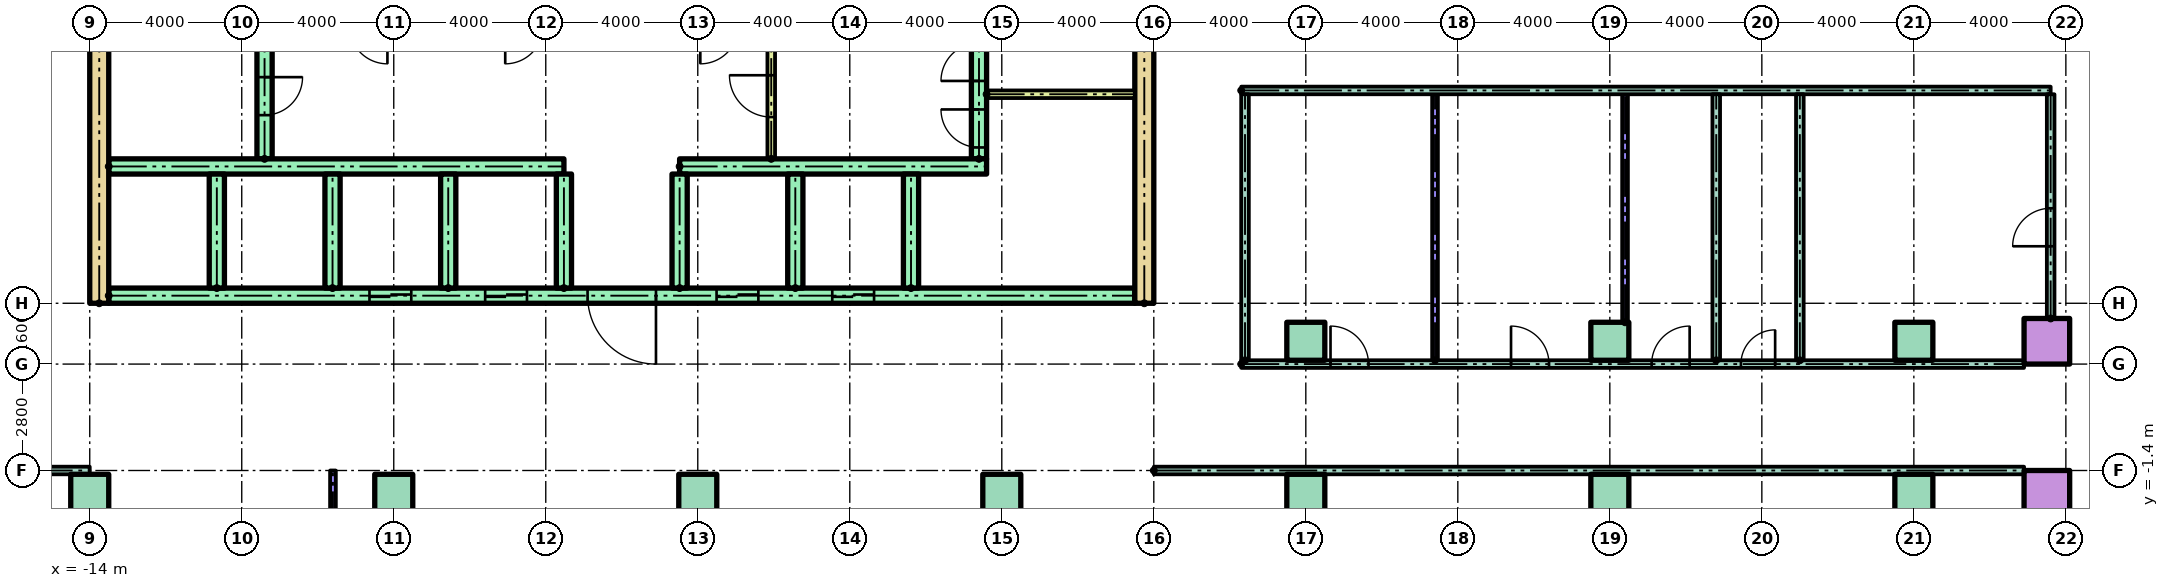
"""IFC4 building model, lengths in metres.
Left out: names, types, materials, properties, quantities, classifications, styles, units other than length and angle.
Written with IfcOpenShell. Run it as: python <this file> out.ifc"""

import sys

from ifc_helpers import new_model, si_unit, direction, frame, frame_2d, origin, origin_2d, place, context, subcontext, project, spatial, rectangle, hollow_rectangle, extrude, element, fill, save


model = new_model("IFC4")
c1 = context("Model", 3, precision=1e-05, world=origin(), true_north=direction((0.0, 1.0)))
c2 = subcontext(c1, "Body", "Model", "MODEL_VIEW")
j1 = project(units=[si_unit("LENGTHUNIT", "METRE"), si_unit("PLANEANGLEUNIT", "RADIAN")], contexts=[c1])
p1 = place(None, origin())
s1 = spatial("IfcSite", under=j1, at=p1, CompositionType="ELEMENT")
p2 = place(p1, origin())
s2 = spatial("IfcBuilding", under=s1, at=p2, CompositionType="ELEMENT")
p3 = place(p2, frame((0.0, 0.0, 14.0)))
s3 = spatial("IfcBuildingStorey", under=s2, at=p3, CompositionType="ELEMENT", Elevation=14.0)
for number, where in (
    (1, (-14.0, -2.0, 0.0)),
    (2, (-6.0, -2.0, 0.0)),
    (3, (2.0, -2.0, 0.0)),
    (4, (10.0, -2.0, 0.0)),
    (5, (18.0, -2.0, 0.0)),
    (6, (26.0, -2.0, 0.0)),
    (7, (34.0, -2.0, 0.0)),
):
    element("IfcColumn", number, at=place(p3, frame(where)), inside=s3, PredefinedType="COLUMN", context=c2, shape_type="SweptSolid", body=[
        extrude(rectangle(XDim=1.0, YDim=1.0, at=origin_2d()), origin(), (0.0, 0.0, 1.0), 4.0),
    ])
p4 = place(p3, frame((37.5, -2.0, 0.0)))
e8 = element("IfcColumn", 8, at=p4, inside=s3, PredefinedType="COLUMN", context=c2, shape_type="SweptSolid", body=[
    extrude(hollow_rectangle(XDim=1.2, YDim=1.2, WallThickness=0.06, at=origin_2d()), origin(), (0.0, 0.0, 1.0), 4.0),
])
for number, where in (
    (9, (18.0, 2.0, 0.0)),
    (10, (26.0, 2.0, 0.0)),
    (11, (34.0, 2.0, 0.0)),
):
    element("IfcColumn", number, at=place(p3, frame(where)), inside=s3, PredefinedType="COLUMN", context=c2, shape_type="SweptSolid", body=[
        extrude(rectangle(XDim=1.0, YDim=1.0, at=origin_2d()), origin(), (0.0, 0.0, 1.0), 4.0),
    ])
p5 = place(p3, frame((37.5, 2.0, 0.0)))
e12 = element("IfcColumn", 12, at=p5, inside=s3, PredefinedType="COLUMN", context=c2, shape_type="SweptSolid", body=[
    extrude(hollow_rectangle(XDim=1.2, YDim=1.2, WallThickness=0.06, at=origin_2d()), origin(), (0.0, 0.0, 1.0), 4.0),
])
for number, where, z_axis, x_axis in (
    (13, (-13.75, 3.0, 0.0), (0.0, 0.0, 1.0), (0.0, 1.0, 0.0)),
    (14, (13.75, 3.0, 0.0), (0.0, 0.0, 1.0), (0.0, 1.0, 0.0)),
):
    element("IfcWall", number, at=place(p3, frame(where, z_axis=z_axis, x_axis=x_axis)), inside=s3, PredefinedType="SHEAR", context=c2, shape_type="SweptSolid", body=[
        extrude(rectangle(XDim=17.0, YDim=0.5, at=frame_2d((8.5, 0.0))), origin(), (0.0, 0.0, 1.0), 3.7),
    ])
p6 = place(p3, frame((-9.4, 6.8, 0.0), z_axis=(0.0, 0.0, 1.0), x_axis=(0.0, 1.0, 0.0)))
e15 = element("IfcWall", 15, at=p6, inside=s3, PredefinedType="SHEAR", context=c2, shape_type="SweptSolid", body=[
    extrude(rectangle(XDim=12.7, YDim=0.4, at=frame_2d((6.35, 0.0))), origin(), (0.0, 0.0, 1.0), 3.7),
])
p7 = place(p6, frame((1.15, 0.0, 0.0)))
e16 = element("IfcOpeningElement", 16, at=p7, cuts=e15, PredefinedType="OPENING", context=c2, shape_type="SweptSolid", body=[
    extrude(rectangle(XDim=1.0, YDim=2.1, at=frame_2d((0.5, 1.05))), frame((0.0, 0.21, 0.0), z_axis=(0.0, -1.0, 0.0), x_axis=(1.0, 0.0, 0.0)), (0.0, 0.0, 1.0), 0.42),
])
p8 = place(p6, frame((7.925, 0.0, 0.0)))
e17 = element("IfcOpeningElement", 17, at=p8, cuts=e15, PredefinedType="OPENING", context=c2, shape_type="SweptSolid", body=[
    extrude(rectangle(XDim=1.0, YDim=2.1, at=frame_2d((0.5, 1.05))), frame((0.0, 0.21, 0.0), z_axis=(0.0, -1.0, 0.0), x_axis=(1.0, 0.0, 0.0)), (0.0, 0.0, 1.0), 0.42),
])
p9 = place(p3, frame((9.4, 6.8, 0.0), z_axis=(0.0, 0.0, 1.0), x_axis=(0.0, 1.0, 0.0)))
e18 = element("IfcWall", 18, at=p9, inside=s3, PredefinedType="SHEAR", context=c2, shape_type="SweptSolid", body=[
    extrude(rectangle(XDim=12.7, YDim=0.4, at=frame_2d((6.35, 0.0))), origin(), (0.0, 0.0, 1.0), 3.7),
])
p10 = place(p9, frame((0.3, 0.0, 0.0)))
e19 = element("IfcOpeningElement", 19, at=p10, cuts=e18, PredefinedType="OPENING", context=c2, shape_type="SweptSolid", body=[
    extrude(rectangle(XDim=1.0, YDim=2.1, at=frame_2d((0.5, 1.05))), frame((0.0, 0.21, 0.0), z_axis=(0.0, -1.0, 0.0), x_axis=(1.0, 0.0, 0.0)), (0.0, 0.0, 1.0), 0.42),
])
p11 = place(p9, frame((2.05, 0.0, 0.0)))
e20 = element("IfcOpeningElement", 20, at=p11, cuts=e18, PredefinedType="OPENING", context=c2, shape_type="SweptSolid", body=[
    extrude(rectangle(XDim=1.0, YDim=2.1, at=frame_2d((0.5, 1.05))), frame((0.0, 0.21, 0.0), z_axis=(0.0, -1.0, 0.0), x_axis=(1.0, 0.0, 0.0)), (0.0, 0.0, 1.0), 0.42),
])
p12 = place(p9, frame((7.925, 0.0, 0.0)))
e21 = element("IfcOpeningElement", 21, at=p12, cuts=e18, PredefinedType="OPENING", context=c2, shape_type="SweptSolid", body=[
    extrude(rectangle(XDim=1.0, YDim=2.1, at=frame_2d((0.5, 1.05))), frame((0.0, 0.21, 0.0), z_axis=(0.0, -1.0, 0.0), x_axis=(1.0, 0.0, 0.0)), (0.0, 0.0, 1.0), 0.42),
])
p13 = place(p3, frame((-13.5, 3.2, 0.0)))
e22 = element("IfcWall", 22, at=p13, inside=s3, PredefinedType="SHEAR", context=c2, shape_type="SweptSolid", body=[
    extrude(rectangle(XDim=27.0, YDim=0.4, at=frame_2d((13.5, 0.0))), origin(), (0.0, 0.0, 1.0), 3.7),
])
p14 = place(p13, frame((6.861, 0.0, 0.0)))
e23 = element("IfcOpeningElement", 23, at=p14, cuts=e22, PredefinedType="OPENING", context=c2, shape_type="SweptSolid", body=[
    extrude(rectangle(XDim=1.1, YDim=2.1, at=frame_2d((0.55, 1.05))), frame((0.0, 0.21, 0.0), z_axis=(0.0, -1.0, 0.0), x_axis=(1.0, 0.0, 0.0)), (0.0, 0.0, 1.0), 0.42),
])
p15 = place(p13, frame((9.906, 0.0, 0.0)))
e24 = element("IfcOpeningElement", 24, at=p15, cuts=e22, PredefinedType="OPENING", context=c2, shape_type="SweptSolid", body=[
    extrude(rectangle(XDim=1.1, YDim=2.1, at=frame_2d((0.55, 1.05))), frame((0.0, 0.21, 0.0), z_axis=(0.0, -1.0, 0.0), x_axis=(1.0, 0.0, 0.0)), (0.0, 0.0, 1.0), 0.42),
])
p16 = place(p13, frame((15.994, 0.0, 0.0)))
e25 = element("IfcOpeningElement", 25, at=p16, cuts=e22, PredefinedType="OPENING", context=c2, shape_type="SweptSolid", body=[
    extrude(rectangle(XDim=1.1, YDim=2.1, at=frame_2d((0.55, 1.05))), frame((0.0, 0.21, 0.0), z_axis=(0.0, -1.0, 0.0), x_axis=(1.0, 0.0, 0.0)), (0.0, 0.0, 1.0), 0.42),
])
p17 = place(p13, frame((19.039, 0.0, 0.0)))
e26 = element("IfcOpeningElement", 26, at=p17, cuts=e22, PredefinedType="OPENING", context=c2, shape_type="SweptSolid", body=[
    extrude(rectangle(XDim=1.1, YDim=2.1, at=frame_2d((0.55, 1.05))), frame((0.0, 0.21, 0.0), z_axis=(0.0, -1.0, 0.0), x_axis=(1.0, 0.0, 0.0)), (0.0, 0.0, 1.0), 0.42),
])
p18 = place(p13, frame((12.6, 0.0, 0.0)))
e27 = element("IfcOpeningElement", 27, at=p18, cuts=e22, PredefinedType="OPENING", context=c2, shape_type="SweptSolid", body=[
    extrude(rectangle(XDim=1.8, YDim=2.1, at=frame_2d((0.9, 1.05))), frame((0.0, 0.21, 0.0), z_axis=(0.0, -1.0, 0.0), x_axis=(1.0, 0.0, 0.0)), (0.0, 0.0, 1.0), 0.42),
])
p19 = place(p3, frame((-13.5, 6.6, 0.0)))
e28 = element("IfcWall", 28, at=p19, inside=s3, PredefinedType="SHEAR", context=c2, shape_type="SweptSolid", body=[
    extrude(rectangle(XDim=11.978, YDim=0.4, at=frame_2d((5.989, 0.0))), origin(), (0.0, 0.0, 1.0), 3.7),
])
p20 = place(p3, frame((1.522, 6.6, 0.0)))
e29 = element("IfcWall", 29, at=p20, inside=s3, PredefinedType="SHEAR", context=c2, shape_type="SweptSolid", body=[
    extrude(rectangle(XDim=8.078, YDim=0.4, at=frame_2d((4.039, 0.0))), origin(), (0.0, 0.0, 1.0), 3.7),
])
for number, where, z_axis, x_axis in (
    (30, (-10.656, 3.4, 0.0), (0.0, 0.0, 1.0), (0.0, 1.0, 0.0)),
    (31, (-7.611, 3.4, 0.0), (0.0, 0.0, 1.0), (0.0, 1.0, 0.0)),
    (32, (-4.567, 3.4, 0.0), (0.0, 0.0, 1.0), (0.0, 1.0, 0.0)),
    (33, (-1.522, 3.4, 0.0), (0.0, 0.0, 1.0), (0.0, 1.0, 0.0)),
    (34, (1.522, 3.4, 0.0), (0.0, 0.0, 1.0), (0.0, 1.0, 0.0)),
    (35, (4.567, 3.4, 0.0), (0.0, 0.0, 1.0), (0.0, 1.0, 0.0)),
    (36, (7.611, 3.4, 0.0), (0.0, 0.0, 1.0), (0.0, 1.0, 0.0)),
):
    element("IfcWall", number, at=place(p3, frame(where, z_axis=z_axis, x_axis=x_axis)), inside=s3, PredefinedType="SHEAR", context=c2, shape_type="SweptSolid", body=[
        extrude(rectangle(XDim=3.0, YDim=0.4, at=frame_2d((1.5, 0.0))), origin(), (0.0, 0.0, 1.0), 3.7),
    ])
p21 = place(p3, frame((3.933, 6.8, 0.0), z_axis=(0.0, 0.0, 1.0), x_axis=(0.0, 1.0, 0.0)))
e37 = element("IfcWall", 37, at=p21, inside=s3, PredefinedType="PARTITIONING", context=c2, shape_type="SweptSolid", body=[
    extrude(rectangle(XDim=3.3, YDim=0.2, at=frame_2d((1.65, 0.0))), origin(), (0.0, 0.0, 1.0), 3.7),
])
p22 = place(p21, frame((1.1, 0.0, 0.0)))
e38 = element("IfcOpeningElement", 38, at=p22, cuts=e37, PredefinedType="OPENING", context=c2, shape_type="SweptSolid", body=[
    extrude(rectangle(XDim=1.1, YDim=2.1, at=frame_2d((0.55, 1.05))), frame((0.0, 0.11, 0.0), z_axis=(0.0, -1.0, 0.0), x_axis=(1.0, 0.0, 0.0)), (0.0, 0.0, 1.0), 0.22),
])
p23 = place(p3, frame((9.6, 8.5, 0.0)))
e39 = element("IfcWall", 39, at=p23, inside=s3, PredefinedType="PARTITIONING", context=c2, shape_type="SweptSolid", body=[
    extrude(rectangle(XDim=3.9, YDim=0.2, at=frame_2d((1.95, 0.0))), origin(), (0.0, 0.0, 1.0), 3.7),
])
for number, where in (
    (40, (-36.9, -1.4, 0.0)),
    (41, (14.0, -1.4, 0.0)),
):
    element("IfcWall", number, at=place(p3, frame(where)), inside=s3, PredefinedType="PARTITIONING", context=c2, shape_type="SweptSolid", body=[
        extrude(rectangle(XDim=22.9, YDim=0.2, at=frame_2d((11.45, 0.0))), origin(), (0.0, 0.0, 1.0), 3.7),
    ])
p24 = place(p3, frame((16.3, 1.4, 0.0)))
e42 = element("IfcWall", 42, at=p24, inside=s3, PredefinedType="PARTITIONING", context=c2, shape_type="SweptSolid", body=[
    extrude(rectangle(XDim=20.6, YDim=0.2, at=frame_2d((10.3, 0.0))), origin(), (0.0, 0.0, 1.0), 3.7),
])
p25 = place(p24, frame((2.35, 0.0, 0.0)))
e43 = element("IfcOpeningElement", 43, at=p25, cuts=e42, PredefinedType="OPENING", context=c2, shape_type="SweptSolid", body=[
    extrude(rectangle(XDim=1.0, YDim=2.1, at=frame_2d((0.5, 1.05))), frame((0.0, 0.11, 0.0), z_axis=(0.0, -1.0, 0.0), x_axis=(1.0, 0.0, 0.0)), (0.0, 0.0, 1.0), 0.22),
])
p26 = place(p24, frame((7.1, 0.0, 0.0)))
e44 = element("IfcOpeningElement", 44, at=p26, cuts=e42, PredefinedType="OPENING", context=c2, shape_type="SweptSolid", body=[
    extrude(rectangle(XDim=1.0, YDim=2.1, at=frame_2d((0.5, 1.05))), frame((0.0, 0.11, 0.0), z_axis=(0.0, -1.0, 0.0), x_axis=(1.0, 0.0, 0.0)), (0.0, 0.0, 1.0), 0.22),
])
p27 = place(p24, frame((10.8, 0.0, 0.0)))
e45 = element("IfcOpeningElement", 45, at=p27, cuts=e42, PredefinedType="OPENING", context=c2, shape_type="SweptSolid", body=[
    extrude(rectangle(XDim=1.0, YDim=2.1, at=frame_2d((0.5, 1.05))), frame((0.0, 0.11, 0.0), z_axis=(0.0, -1.0, 0.0), x_axis=(1.0, 0.0, 0.0)), (0.0, 0.0, 1.0), 0.22),
])
p28 = place(p24, frame((13.15, 0.0, 0.0)))
e46 = element("IfcOpeningElement", 46, at=p28, cuts=e42, PredefinedType="OPENING", context=c2, shape_type="SweptSolid", body=[
    extrude(rectangle(XDim=0.9, YDim=2.1, at=frame_2d((0.45, 1.05))), frame((0.0, 0.11, 0.0), z_axis=(0.0, -1.0, 0.0), x_axis=(1.0, 0.0, 0.0)), (0.0, 0.0, 1.0), 0.22),
])
p29 = place(p3, frame((16.3, 8.6, 0.0)))
e47 = element("IfcWall", 47, at=p29, inside=s3, PredefinedType="PARTITIONING", context=c2, shape_type="SweptSolid", body=[
    extrude(rectangle(XDim=21.3, YDim=0.2, at=frame_2d((10.65, 0.0))), origin(), (0.0, 0.0, 1.0), 3.7),
])
p30 = place(p3, frame((-7.6, -6.25, 0.0), z_axis=(0.0, 0.0, 1.0), x_axis=(0.0, 1.0, 0.0)))
e48 = element("IfcWall", 48, at=p30, inside=s3, PredefinedType="PARTITIONING", context=c2, shape_type="SweptSolid", body=[
    extrude(rectangle(XDim=4.85, YDim=0.15, at=frame_2d((2.425, 0.0))), origin(), (0.0, 0.0, 1.0), 3.7),
])
p31 = place(p3, frame((16.4, 1.5, 0.0), z_axis=(0.0, 0.0, 1.0), x_axis=(0.0, 1.0, 0.0)))
e49 = element("IfcWall", 49, at=p31, inside=s3, PredefinedType="PARTITIONING", context=c2, shape_type="SweptSolid", body=[
    extrude(rectangle(XDim=7.0, YDim=0.2, at=frame_2d((3.5, 0.0))), origin(), (0.0, 0.0, 1.0), 3.7),
])
p32 = place(p3, frame((21.4, 1.5, 0.0), z_axis=(0.0, 0.0, 1.0), x_axis=(0.0, 1.0, 0.0)))
e50 = element("IfcWall", 50, at=p32, inside=s3, PredefinedType="PARTITIONING", context=c2, shape_type="SweptSolid", body=[
    extrude(rectangle(XDim=7.0, YDim=0.15, at=frame_2d((3.5, 0.0))), origin(), (0.0, 0.0, 1.0), 3.7),
])
p33 = place(p3, frame((26.4, 2.5, 0.0), z_axis=(0.0, 0.0, 1.0), x_axis=(0.0, 1.0, 0.0)))
e51 = element("IfcWall", 51, at=p33, inside=s3, PredefinedType="PARTITIONING", context=c2, shape_type="SweptSolid", body=[
    extrude(rectangle(XDim=6.0, YDim=0.15, at=frame_2d((3.0, 0.0))), origin(), (0.0, 0.0, 1.0), 3.7),
])
for number, where, z_axis, x_axis in (
    (52, (28.8, 1.5, 0.0), (0.0, 0.0, 1.0), (0.0, 1.0, 0.0)),
    (53, (31.0, 1.5, 0.0), (0.0, 0.0, 1.0), (0.0, 1.0, 0.0)),
):
    element("IfcWall", number, at=place(p3, frame(where, z_axis=z_axis, x_axis=x_axis)), inside=s3, PredefinedType="PARTITIONING", context=c2, shape_type="SweptSolid", body=[
        extrude(rectangle(XDim=7.0, YDim=0.2, at=frame_2d((3.5, 0.0))), origin(), (0.0, 0.0, 1.0), 3.7),
    ])
p34 = place(p3, frame((37.6, 2.6, 0.0), z_axis=(0.0, 0.0, 1.0), x_axis=(0.0, 1.0, 0.0)))
e54 = element("IfcWall", 54, at=p34, inside=s3, PredefinedType="PARTITIONING", context=c2, shape_type="SweptSolid", body=[
    extrude(rectangle(XDim=5.9, YDim=0.2, at=frame_2d((2.95, 0.0))), origin(), (0.0, 0.0, 1.0), 3.7),
])
p35 = place(p34, frame((1.9, 0.0, 0.0)))
e55 = element("IfcOpeningElement", 55, at=p35, cuts=e54, PredefinedType="OPENING", context=c2, shape_type="SweptSolid", body=[
    extrude(rectangle(XDim=1.0, YDim=2.1, at=frame_2d((0.5, 1.05))), frame((0.0, 0.11, 0.0), z_axis=(0.0, -1.0, 0.0), x_axis=(1.0, 0.0, 0.0)), (0.0, 0.0, 1.0), 0.22),
])
p36 = place(p14, origin())
e56 = element("IfcDoor", 56, at=p36, inside=s3, OperationType="SLIDING_TO_LEFT", PredefinedType="DOOR", context=c2, shape_type="SweptSolid", body=[
    extrude(rectangle(XDim=1.1, YDim=2.1, at=frame_2d((0.55, 1.05))), frame((0.0, 0.025, 0.0), z_axis=(0.0, -1.0, 0.0), x_axis=(1.0, 0.0, 0.0)), (0.0, 0.0, 1.0), 0.05),
])
fill(e23, e56)
p37 = place(p15, origin())
e57 = element("IfcDoor", 57, at=p37, inside=s3, OperationType="SLIDING_TO_LEFT", PredefinedType="DOOR", context=c2, shape_type="SweptSolid", body=[
    extrude(rectangle(XDim=1.1, YDim=2.1, at=frame_2d((0.55, 1.05))), frame((0.0, 0.025, 0.0), z_axis=(0.0, -1.0, 0.0), x_axis=(1.0, 0.0, 0.0)), (0.0, 0.0, 1.0), 0.05),
])
fill(e24, e57)
p38 = place(p16, origin())
e58 = element("IfcDoor", 58, at=p38, inside=s3, OperationType="SLIDING_TO_LEFT", PredefinedType="DOOR", context=c2, shape_type="SweptSolid", body=[
    extrude(rectangle(XDim=1.1, YDim=2.1, at=frame_2d((0.55, 1.05))), frame((0.0, 0.025, 0.0), z_axis=(0.0, -1.0, 0.0), x_axis=(1.0, 0.0, 0.0)), (0.0, 0.0, 1.0), 0.05),
])
fill(e25, e58)
p39 = place(p17, origin())
e59 = element("IfcDoor", 59, at=p39, inside=s3, OperationType="SLIDING_TO_LEFT", PredefinedType="DOOR", context=c2, shape_type="SweptSolid", body=[
    extrude(rectangle(XDim=1.1, YDim=2.1, at=frame_2d((0.55, 1.05))), frame((0.0, 0.025, 0.0), z_axis=(0.0, -1.0, 0.0), x_axis=(1.0, 0.0, 0.0)), (0.0, 0.0, 1.0), 0.05),
])
fill(e26, e59)
p40 = place(p18, frame((1.8, 0.0, 0.0), z_axis=(0.0, 0.0, 1.0), x_axis=(-1.0, 0.0, 0.0)))
e60 = element("IfcDoor", 60, at=p40, inside=s3, OperationType="DOUBLE_DOOR_SINGLE_SWING", PredefinedType="DOOR", context=c2, shape_type="SweptSolid", body=[
    extrude(rectangle(XDim=1.8, YDim=2.1, at=frame_2d((0.9, 1.05))), frame((0.0, 0.025, 0.0), z_axis=(0.0, -1.0, 0.0), x_axis=(1.0, 0.0, 0.0)), (0.0, 0.0, 1.0), 0.05),
])
fill(e27, e60)
p41 = place(p22, origin())
e61 = element("IfcDoor", 61, at=p41, inside=s3, OperationType="SINGLE_SWING_RIGHT", PredefinedType="DOOR", context=c2, shape_type="SweptSolid", body=[
    extrude(rectangle(XDim=1.1, YDim=2.1, at=frame_2d((0.55, 1.05))), frame((0.0, 0.025, 0.0), z_axis=(0.0, -1.0, 0.0), x_axis=(1.0, 0.0, 0.0)), (0.0, 0.0, 1.0), 0.05),
])
fill(e38, e61)
p42 = place(p7, frame((1.0, 0.0, 0.0), z_axis=(0.0, 0.0, 1.0), x_axis=(-1.0, 0.0, 0.0)))
e62 = element("IfcDoor", 62, at=p42, inside=s3, OperationType="SINGLE_SWING_RIGHT", PredefinedType="DOOR", context=c2, shape_type="SweptSolid", body=[
    extrude(rectangle(XDim=1.0, YDim=2.1, at=frame_2d((0.5, 1.05))), frame((0.0, 0.025, 0.0), z_axis=(0.0, -1.0, 0.0), x_axis=(1.0, 0.0, 0.0)), (0.0, 0.0, 1.0), 0.05),
])
fill(e16, e62)
p43 = place(p10, origin())
e63 = element("IfcDoor", 63, at=p43, inside=s3, OperationType="SINGLE_SWING_RIGHT", PredefinedType="DOOR", context=c2, shape_type="SweptSolid", body=[
    extrude(rectangle(XDim=1.0, YDim=2.1, at=frame_2d((0.5, 1.05))), frame((0.0, 0.025, 0.0), z_axis=(0.0, -1.0, 0.0), x_axis=(1.0, 0.0, 0.0)), (0.0, 0.0, 1.0), 0.05),
])
fill(e19, e63)
p44 = place(p11, origin())
e64 = element("IfcDoor", 64, at=p44, inside=s3, OperationType="SINGLE_SWING_LEFT", PredefinedType="DOOR", context=c2, shape_type="SweptSolid", body=[
    extrude(rectangle(XDim=1.0, YDim=2.1, at=frame_2d((0.5, 1.05))), frame((0.0, 0.025, 0.0), z_axis=(0.0, -1.0, 0.0), x_axis=(1.0, 0.0, 0.0)), (0.0, 0.0, 1.0), 0.05),
])
fill(e20, e64)
p45 = place(p25, origin())
e65 = element("IfcDoor", 65, at=p45, inside=s3, OperationType="SINGLE_SWING_LEFT", PredefinedType="DOOR", context=c2, shape_type="SweptSolid", body=[
    extrude(rectangle(XDim=1.0, YDim=2.1, at=frame_2d((0.5, 1.05))), frame((0.0, 0.025, 0.0), z_axis=(0.0, -1.0, 0.0), x_axis=(1.0, 0.0, 0.0)), (0.0, 0.0, 1.0), 0.05),
])
fill(e43, e65)
p46 = place(p26, origin())
e66 = element("IfcDoor", 66, at=p46, inside=s3, OperationType="SINGLE_SWING_LEFT", PredefinedType="DOOR", context=c2, shape_type="SweptSolid", body=[
    extrude(rectangle(XDim=1.0, YDim=2.1, at=frame_2d((0.5, 1.05))), frame((0.0, 0.025, 0.0), z_axis=(0.0, -1.0, 0.0), x_axis=(1.0, 0.0, 0.0)), (0.0, 0.0, 1.0), 0.05),
])
fill(e44, e66)
p47 = place(p27, origin())
e67 = element("IfcDoor", 67, at=p47, inside=s3, OperationType="SINGLE_SWING_RIGHT", PredefinedType="DOOR", context=c2, shape_type="SweptSolid", body=[
    extrude(rectangle(XDim=1.0, YDim=2.1, at=frame_2d((0.5, 1.05))), frame((0.0, 0.025, 0.0), z_axis=(0.0, -1.0, 0.0), x_axis=(1.0, 0.0, 0.0)), (0.0, 0.0, 1.0), 0.05),
])
fill(e45, e67)
p48 = place(p28, origin())
e68 = element("IfcDoor", 68, at=p48, inside=s3, OperationType="SINGLE_SWING_RIGHT", PredefinedType="DOOR", context=c2, shape_type="SweptSolid", body=[
    extrude(rectangle(XDim=0.9, YDim=2.1, at=frame_2d((0.45, 1.05))), frame((0.0, 0.025, 0.0), z_axis=(0.0, -1.0, 0.0), x_axis=(1.0, 0.0, 0.0)), (0.0, 0.0, 1.0), 0.05),
])
fill(e46, e68)
p49 = place(p35, origin())
e69 = element("IfcDoor", 69, at=p49, inside=s3, OperationType="SINGLE_SWING_LEFT", PredefinedType="DOOR", context=c2, shape_type="SweptSolid", body=[
    extrude(rectangle(XDim=1.0, YDim=2.1, at=frame_2d((0.5, 1.05))), frame((0.0, 0.025, 0.0), z_axis=(0.0, -1.0, 0.0), x_axis=(1.0, 0.0, 0.0)), (0.0, 0.0, 1.0), 0.05),
])
fill(e55, e69)
save(model, sys.argv[1])
